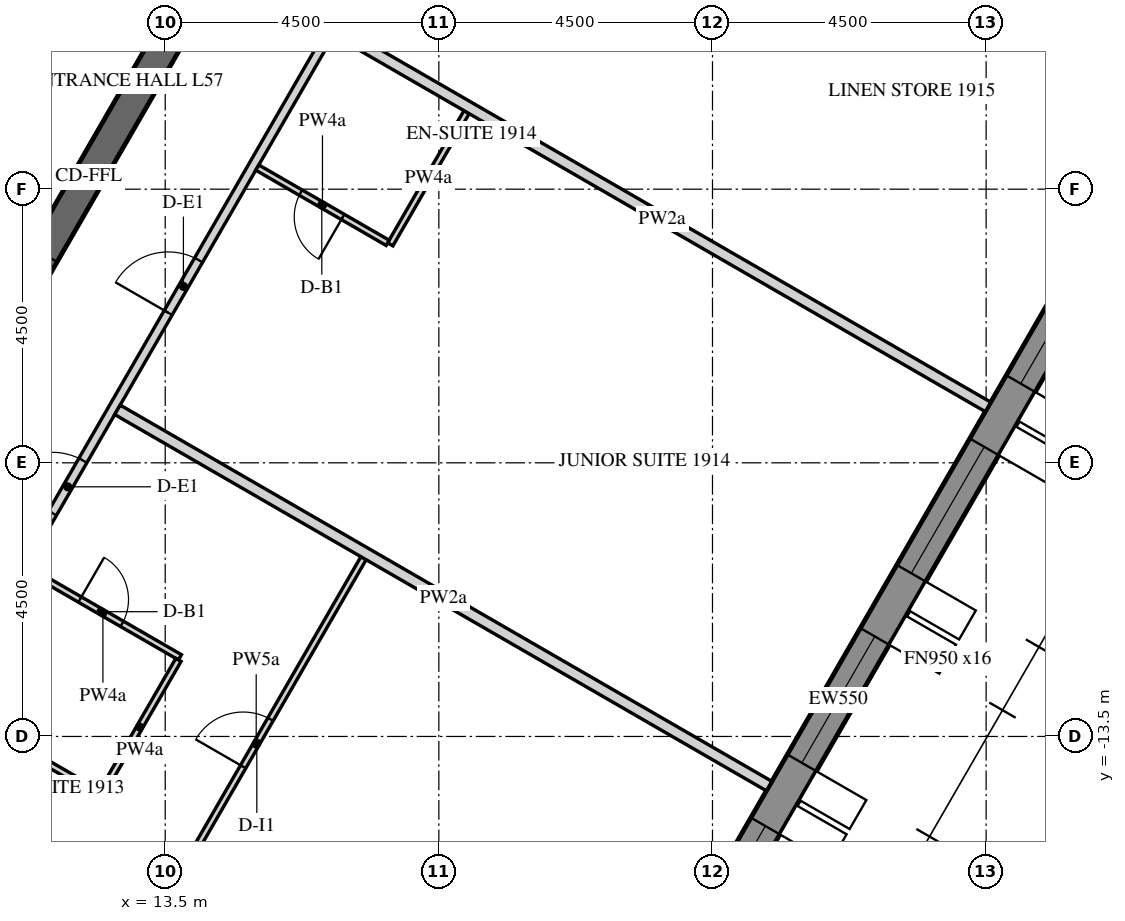
"""IFC4 building model, lengths in metres.
Left out: names, types, materials, properties, quantities, classifications, styles, units other than length and angle.
Written with IfcOpenShell. Run it as: python <this file> out.ifc"""

import sys

from ifc_helpers import new_model, si_unit, direction, frame, frame_2d, origin, place, context, subcontext, project, spatial, polyline, rectangle, outline, extrude, element, fill, save


model = new_model("IFC4")
c1 = context("Model", 3, precision=1e-05, world=origin(), true_north=direction((0.0, 1.0)))
c2 = subcontext(c1, "Body", "Model", "MODEL_VIEW")
j1 = project(units=[si_unit("LENGTHUNIT", "METRE"), si_unit("PLANEANGLEUNIT", "RADIAN")], contexts=[c1])
p1 = place(None, origin())
s1 = spatial("IfcSite", under=j1, at=p1, CompositionType="ELEMENT")
p2 = place(p1, origin())
s2 = spatial("IfcBuilding", under=s1, at=p2, CompositionType="ELEMENT")
p3 = place(p2, frame((0.0, 0.0, 238.5)))
s3 = spatial("IfcBuildingStorey", under=s2, at=p3, CompositionType="ELEMENT", Elevation=238.5)
p4 = place(p3, frame((17.63, -24.914, -0.15), z_axis=(0.0, 0.0, 1.0), x_axis=(0.499998569178, 0.866026229868, 0.0)))
e1 = element("IfcWall", 1, at=p4, inside=s3, PredefinedType="SOLIDWALL", context=c2, shape_type="SweptSolid", body=[
    extrude(outline(polyline([(-0.022, -0.275), (27.783, -0.275), (27.732, 0.275), (0.022, 0.275), (-0.022, -0.275)])), origin(), (0.0, 0.0, 1.0), 3.9),
])
p5 = place(p4, frame((1.879, 0.0, 1.05)))
e2 = element("IfcOpeningElement", 2, at=p5, cuts=e1, PredefinedType="OPENING", context=c2, shape_type="SweptSolid", body=[
    extrude(rectangle(XDim=2.4, YDim=2.4, at=frame_2d((1.2, 1.2))), frame((0.0, 0.285, 0.0), z_axis=(0.0, -1.0, 0.0), x_axis=(1.0, 0.0, 0.0)), (0.0, 0.0, 1.0), 0.57),
])
p6 = place(p4, frame((5.479, 0.0, 1.05)))
e3 = element("IfcOpeningElement", 3, at=p6, cuts=e1, PredefinedType="OPENING", context=c2, shape_type="SweptSolid", body=[
    extrude(rectangle(XDim=2.4, YDim=2.4, at=frame_2d((1.2, 1.2))), frame((0.0, 0.285, 0.0), z_axis=(0.0, -1.0, 0.0), x_axis=(1.0, 0.0, 0.0)), (0.0, 0.0, 1.0), 0.57),
])
p7 = place(p4, frame((9.079, 0.0, 1.05)))
e4 = element("IfcOpeningElement", 4, at=p7, cuts=e1, PredefinedType="OPENING", context=c2, shape_type="SweptSolid", body=[
    extrude(rectangle(XDim=2.4, YDim=2.4, at=frame_2d((1.2, 1.2))), frame((0.0, 0.285, 0.0), z_axis=(0.0, -1.0, 0.0), x_axis=(1.0, 0.0, 0.0)), (0.0, 0.0, 1.0), 0.57),
])
p8 = place(p4, frame((12.679, 0.0, 1.05)))
e5 = element("IfcOpeningElement", 5, at=p8, cuts=e1, PredefinedType="OPENING", context=c2, shape_type="SweptSolid", body=[
    extrude(rectangle(XDim=2.4, YDim=2.4, at=frame_2d((1.2, 1.2))), frame((0.0, 0.285, 0.0), z_axis=(0.0, -1.0, 0.0), x_axis=(1.0, 0.0, 0.0)), (0.0, 0.0, 1.0), 0.57),
])
p9 = place(p4, frame((16.279, 0.0, 1.05)))
e6 = element("IfcOpeningElement", 6, at=p9, cuts=e1, PredefinedType="OPENING", context=c2, shape_type="SweptSolid", body=[
    extrude(rectangle(XDim=2.4, YDim=2.4, at=frame_2d((1.2, 1.2))), frame((0.0, 0.285, 0.0), z_axis=(0.0, -1.0, 0.0), x_axis=(1.0, 0.0, 0.0)), (0.0, 0.0, 1.0), 0.57),
])
p10 = place(p4, frame((19.879, 0.0, 1.05)))
e7 = element("IfcOpeningElement", 7, at=p10, cuts=e1, PredefinedType="OPENING", context=c2, shape_type="SweptSolid", body=[
    extrude(rectangle(XDim=2.4, YDim=2.4, at=frame_2d((1.2, 1.2))), frame((0.0, 0.285, 0.0), z_axis=(0.0, -1.0, 0.0), x_axis=(1.0, 0.0, 0.0)), (0.0, 0.0, 1.0), 0.57),
])
p11 = place(p4, frame((23.479, 0.0, 1.05)))
e8 = element("IfcOpeningElement", 8, at=p11, cuts=e1, PredefinedType="OPENING", context=c2, shape_type="SweptSolid", body=[
    extrude(rectangle(XDim=2.4, YDim=2.4, at=frame_2d((1.2, 1.2))), frame((0.0, 0.285, 0.0), z_axis=(0.0, -1.0, 0.0), x_axis=(1.0, 0.0, 0.0)), (0.0, 0.0, 1.0), 0.57),
])
p12 = place(p3, frame((7.361, -12.75, -0.15), z_axis=(0.0, 0.0, 1.0), x_axis=(0.50000571537, 0.866022103989, 0.0)))
e9 = element("IfcWall", 9, at=p12, inside=s3, PredefinedType="SHEAR", context=c2, shape_type="SweptSolid", body=[
    extrude(outline(polyline([(-0.144, -0.25), (14.867, -0.25), (14.578, 0.25), (0.144, 0.25), (-0.144, -0.25)])), origin(), (0.0, 0.0, 1.0), 3.9),
])
p13 = place(p12, frame((6.49, 0.0, 0.15)))
e10 = element("IfcOpeningElement", 10, at=p13, cuts=e9, PredefinedType="OPENING", context=c2, shape_type="SweptSolid", body=[
    extrude(rectangle(XDim=1.8, YDim=2.4, at=frame_2d((0.9, 1.2))), frame((0.0, 0.26, 0.0), z_axis=(0.0, -1.0, 0.0), x_axis=(1.0, 0.0, 0.0)), (0.0, 0.0, 1.0), 0.52),
])
p14 = place(p3, frame((7.506, -13.0, -0.15), z_axis=(0.0, 0.0, 1.0), x_axis=(0.499988271576, -0.866032175087, 0.0)))
e11 = element("IfcWall", 11, at=p14, inside=s3, PredefinedType="SHEAR", context=c2, shape_type="SweptSolid", body=[
    extrude(rectangle(XDim=15.424, YDim=0.5, at=frame_2d((7.712, 0.0))), origin(), (0.0, 0.0, 1.0), 3.9),
])
p15 = place(p14, frame((6.812, 0.0, 0.15)))
e12 = element("IfcOpeningElement", 12, at=p15, cuts=e11, PredefinedType="OPENING", context=c2, shape_type="SweptSolid", body=[
    extrude(rectangle(XDim=1.8, YDim=2.4, at=frame_2d((0.9, 1.2))), frame((0.0, 0.26, 0.0), z_axis=(0.0, -1.0, 0.0), x_axis=(1.0, 0.0, 0.0)), (0.0, 0.0, 1.0), 0.52),
])
p16 = place(p3, frame((13.699, -19.628, 0.0), z_axis=(0.0, 0.0, 1.0), x_axis=(-0.499993780622, 0.866028994514, 0.0)))
e13 = element("IfcWall", 13, at=p16, inside=s3, PredefinedType="PARTITIONING", context=c2, shape_type="SweptSolid", body=[
    extrude(rectangle(XDim=7.711, YDim=0.15, at=frame_2d((3.855, 0.0))), origin(), (0.0, 0.0, 1.0), 2.838),
])
p17 = place(p3, frame((9.887, -12.875, 0.0), z_axis=(0.0, 0.0, 1.0), x_axis=(0.499998228944, 0.866026426302, 0.0)))
e14 = element("IfcWall", 14, at=p17, inside=s3, PredefinedType="PARTITIONING", context=c2, shape_type="SweptSolid", body=[
    extrude(rectangle(XDim=14.867, YDim=0.15, at=frame_2d((7.433, 0.0))), origin(), (0.0, 0.0, 1.0), 2.838),
])
p18 = place(p17, frame((3.519, 0.0, 0.0)))
e15 = element("IfcOpeningElement", 15, at=p18, cuts=e14, PredefinedType="OPENING", context=c2, shape_type="SweptSolid", body=[
    extrude(rectangle(XDim=1.0, YDim=2.1, at=frame_2d((0.5, 1.05))), frame((0.0, 0.085, 0.0), z_axis=(0.0, -1.0, 0.0), x_axis=(1.0, 0.0, 0.0)), (0.0, 0.0, 1.0), 0.17),
])
p19 = place(p17, frame((7.324, 0.0, 0.0)))
e16 = element("IfcOpeningElement", 16, at=p19, cuts=e14, PredefinedType="OPENING", context=c2, shape_type="SweptSolid", body=[
    extrude(rectangle(XDim=1.0, YDim=2.1, at=frame_2d((0.5, 1.05))), frame((0.0, 0.085, 0.0), z_axis=(0.0, -1.0, 0.0), x_axis=(1.0, 0.0, 0.0)), (0.0, 0.0, 1.0), 0.17),
])
p20 = place(p17, frame((13.717, 0.0, 0.0)))
e17 = element("IfcOpeningElement", 17, at=p20, cuts=e14, PredefinedType="OPENING", context=c2, shape_type="SweptSolid", body=[
    extrude(rectangle(XDim=1.0, YDim=2.1, at=frame_2d((0.5, 1.05))), frame((0.0, 0.085, 0.0), z_axis=(0.0, -1.0, 0.0), x_axis=(1.0, 0.0, 0.0)), (0.0, 0.0, 1.0), 0.17),
])
p21 = place(p3, frame((11.209, -10.736, 0.0), z_axis=(0.0, 0.0, 1.0), x_axis=(0.866046596414, -0.499963291492, 0.0)))
e18 = element("IfcWall", 18, at=p21, inside=s3, PredefinedType="PARTITIONING", context=c2, shape_type="SweptSolid", body=[
    extrude(rectangle(XDim=2.925, YDim=0.1, at=frame_2d((1.462, 0.0))), origin(), (0.0, 0.0, 1.0), 2.838),
])
p22 = place(p21, frame((1.025, 0.0, 0.0)))
e19 = element("IfcOpeningElement", 19, at=p22, cuts=e18, PredefinedType="OPENING", context=c2, shape_type="SweptSolid", body=[
    extrude(rectangle(XDim=0.8, YDim=2.1, at=frame_2d((0.4, 1.05))), frame((0.0, 0.06, 0.0), z_axis=(0.0, -1.0, 0.0), x_axis=(1.0, 0.0, 0.0)), (0.0, 0.0, 1.0), 0.12),
])
p23 = place(p3, frame((13.717, -12.242, 0.0), z_axis=(0.0, 0.0, 1.0), x_axis=(-0.499990435942, -0.866030925526, 0.0)))
e20 = element("IfcWall", 20, at=p23, inside=s3, PredefinedType="PARTITIONING", context=c2, shape_type="SweptSolid", body=[
    extrude(rectangle(XDim=2.55, YDim=0.1, at=frame_2d((1.275, 0.0))), origin(), (0.0, 0.0, 1.0), 2.838),
])
p24 = place(p3, frame((12.399, -14.425, 0.0), z_axis=(0.0, 0.0, 1.0), x_axis=(-0.866018616679, 0.500011755427, 0.0)))
e21 = element("IfcWall", 21, at=p24, inside=s3, PredefinedType="PARTITIONING", context=c2, shape_type="SweptSolid", body=[
    extrude(rectangle(XDim=2.8, YDim=0.1, at=frame_2d((1.4, 0.0))), origin(), (0.0, 0.0, 1.0), 2.838),
])
p25 = place(p3, frame((13.231, -16.683, 0.0), z_axis=(0.0, 0.0, 1.0), x_axis=(0.499995846692, 0.866027801685, 0.0)))
e22 = element("IfcWall", 22, at=p25, inside=s3, PredefinedType="PARTITIONING", context=c2, shape_type="SweptSolid", body=[
    extrude(rectangle(XDim=7.06, YDim=0.1, at=frame_2d((3.53, 0.0))), origin(), (0.0, 0.0, 1.0), 2.838),
])
p26 = place(p25, frame((3.1, 0.0, 0.0)))
e23 = element("IfcOpeningElement", 23, at=p26, cuts=e22, PredefinedType="OPENING", context=c2, shape_type="SweptSolid", body=[
    extrude(rectangle(XDim=0.9, YDim=2.1, at=frame_2d((0.45, 1.05))), frame((0.0, 0.06, 0.0), z_axis=(0.0, -1.0, 0.0), x_axis=(1.0, 0.0, 0.0)), (0.0, 0.0, 1.0), 0.12),
])
p27 = place(p3, frame((23.431, -14.316, 0.0), z_axis=(0.0, 0.0, 1.0), x_axis=(-0.866024931941, 0.500000817256, 0.0)))
e24 = element("IfcWall", 24, at=p27, inside=s3, PredefinedType="PARTITIONING", context=c2, shape_type="SweptSolid", body=[
    extrude(rectangle(XDim=12.375, YDim=0.18, at=frame_2d((6.188, 0.0))), origin(), (0.0, 0.0, 1.0), 2.838),
])
p28 = place(p3, frame((18.456, -3.233, 0.0), z_axis=(0.0, 0.0, 1.0), x_axis=(-0.500062048339, -0.865989577195, 0.0)))
e25 = element("IfcWall", 25, at=p28, inside=s3, PredefinedType="PARTITIONING", context=c2, shape_type="SweptSolid", body=[
    extrude(rectangle(XDim=2.51, YDim=0.1, at=frame_2d((1.255, 0.0))), origin(), (0.0, 0.0, 1.0), 2.838),
])
p29 = place(p3, frame((17.158, -5.382, 0.0), z_axis=(0.0, 0.0, 1.0), x_axis=(-0.866031185235, 0.4999899861, 0.0)))
e26 = element("IfcWall", 26, at=p29, inside=s3, PredefinedType="PARTITIONING", context=c2, shape_type="SweptSolid", body=[
    extrude(rectangle(XDim=2.475, YDim=0.1, at=frame_2d((1.238, 0.0))), origin(), (0.0, 0.0, 1.0), 2.838),
])
p30 = place(p29, frame((0.85, 0.0, 0.0)))
e27 = element("IfcOpeningElement", 27, at=p30, cuts=e26, PredefinedType="OPENING", context=c2, shape_type="SweptSolid", body=[
    extrude(rectangle(XDim=0.8, YDim=2.1, at=frame_2d((0.4, 1.05))), frame((0.0, 0.06, 0.0), z_axis=(0.0, -1.0, 0.0), x_axis=(1.0, 0.0, 0.0)), (0.0, 0.0, 1.0), 0.12),
])
p31 = place(p3, frame((27.031, -8.08, 0.0), z_axis=(0.0, 0.0, 1.0), x_axis=(-0.866024931941, 0.500000817256, 0.0)))
e28 = element("IfcWall", 28, at=p31, inside=s3, PredefinedType="PARTITIONING", context=c2, shape_type="SweptSolid", body=[
    extrude(rectangle(XDim=12.375, YDim=0.18, at=frame_2d((6.188, 0.0))), origin(), (0.0, 0.0, 1.0), 2.838),
])
p32 = place(p7, frame((0.0, 0.205, 0.0)))
e29 = element("IfcWindow", 29, at=p32, inside=s3, PartitioningType="DOUBLE_PANEL_VERTICAL", PredefinedType="WINDOW", context=c2, shape_type="SweptSolid", body=[
    extrude(rectangle(XDim=2.4, YDim=2.4, at=frame_2d((1.2, 1.2))), frame((0.0, 0.03, 0.0), z_axis=(0.0, -1.0, 0.0), x_axis=(1.0, 0.0, 0.0)), (0.0, 0.0, 1.0), 0.06),
])
fill(e4, e29)
p33 = place(p8, frame((0.0, 0.205, 0.0)))
e30 = element("IfcWindow", 30, at=p33, inside=s3, PartitioningType="DOUBLE_PANEL_VERTICAL", PredefinedType="WINDOW", context=c2, shape_type="SweptSolid", body=[
    extrude(rectangle(XDim=2.4, YDim=2.4, at=frame_2d((1.2, 1.2))), frame((0.0, 0.03, 0.0), z_axis=(0.0, -1.0, 0.0), x_axis=(1.0, 0.0, 0.0)), (0.0, 0.0, 1.0), 0.06),
])
fill(e5, e30)
p34 = place(p9, frame((0.0, 0.205, 0.0)))
e31 = element("IfcWindow", 31, at=p34, inside=s3, PartitioningType="DOUBLE_PANEL_VERTICAL", PredefinedType="WINDOW", context=c2, shape_type="SweptSolid", body=[
    extrude(rectangle(XDim=2.4, YDim=2.4, at=frame_2d((1.2, 1.2))), frame((0.0, 0.03, 0.0), z_axis=(0.0, -1.0, 0.0), x_axis=(1.0, 0.0, 0.0)), (0.0, 0.0, 1.0), 0.06),
])
fill(e6, e31)
p35 = place(p10, frame((0.0, 0.205, 0.0)))
e32 = element("IfcWindow", 32, at=p35, inside=s3, PartitioningType="DOUBLE_PANEL_VERTICAL", PredefinedType="WINDOW", context=c2, shape_type="SweptSolid", body=[
    extrude(rectangle(XDim=2.4, YDim=2.4, at=frame_2d((1.2, 1.2))), frame((0.0, 0.03, 0.0), z_axis=(0.0, -1.0, 0.0), x_axis=(1.0, 0.0, 0.0)), (0.0, 0.0, 1.0), 0.06),
])
fill(e7, e32)
p36 = place(p18, origin())
e33 = element("IfcDoor", 33, at=p36, inside=s3, OperationType="SINGLE_SWING_RIGHT", PredefinedType="DOOR", context=c2, shape_type="SweptSolid", body=[
    extrude(rectangle(XDim=1.0, YDim=2.1, at=frame_2d((0.5, 1.05))), frame((0.0, 0.025, 0.0), z_axis=(0.0, -1.0, 0.0), x_axis=(1.0, 0.0, 0.0)), (0.0, 0.0, 1.0), 0.05),
])
fill(e15, e33)
p37 = place(p22, origin())
e34 = element("IfcDoor", 34, at=p37, inside=s3, OperationType="SINGLE_SWING_RIGHT", PredefinedType="DOOR", context=c2, shape_type="SweptSolid", body=[
    extrude(rectangle(XDim=0.8, YDim=2.1, at=frame_2d((0.4, 1.05))), frame((0.0, 0.025, 0.0), z_axis=(0.0, -1.0, 0.0), x_axis=(1.0, 0.0, 0.0)), (0.0, 0.0, 1.0), 0.05),
])
fill(e19, e34)
p38 = place(p26, origin())
e35 = element("IfcDoor", 35, at=p38, inside=s3, OperationType="SINGLE_SWING_LEFT", PredefinedType="DOOR", context=c2, shape_type="SweptSolid", body=[
    extrude(rectangle(XDim=0.9, YDim=2.1, at=frame_2d((0.45, 1.05))), frame((0.0, 0.025, 0.0), z_axis=(0.0, -1.0, 0.0), x_axis=(1.0, 0.0, 0.0)), (0.0, 0.0, 1.0), 0.05),
])
fill(e23, e35)
p39 = place(p19, origin())
e36 = element("IfcDoor", 36, at=p39, inside=s3, OperationType="SINGLE_SWING_LEFT", PredefinedType="DOOR", context=c2, shape_type="SweptSolid", body=[
    extrude(rectangle(XDim=1.0, YDim=2.1, at=frame_2d((0.5, 1.05))), frame((0.0, 0.025, 0.0), z_axis=(0.0, -1.0, 0.0), x_axis=(1.0, 0.0, 0.0)), (0.0, 0.0, 1.0), 0.05),
])
fill(e16, e36)
p40 = place(p30, origin())
e37 = element("IfcDoor", 37, at=p40, inside=s3, OperationType="SINGLE_SWING_LEFT", PredefinedType="DOOR", context=c2, shape_type="SweptSolid", body=[
    extrude(rectangle(XDim=0.8, YDim=2.1, at=frame_2d((0.4, 1.05))), frame((0.0, 0.025, 0.0), z_axis=(0.0, -1.0, 0.0), x_axis=(1.0, 0.0, 0.0)), (0.0, 0.0, 1.0), 0.05),
])
fill(e27, e37)
save(model, sys.argv[1])
